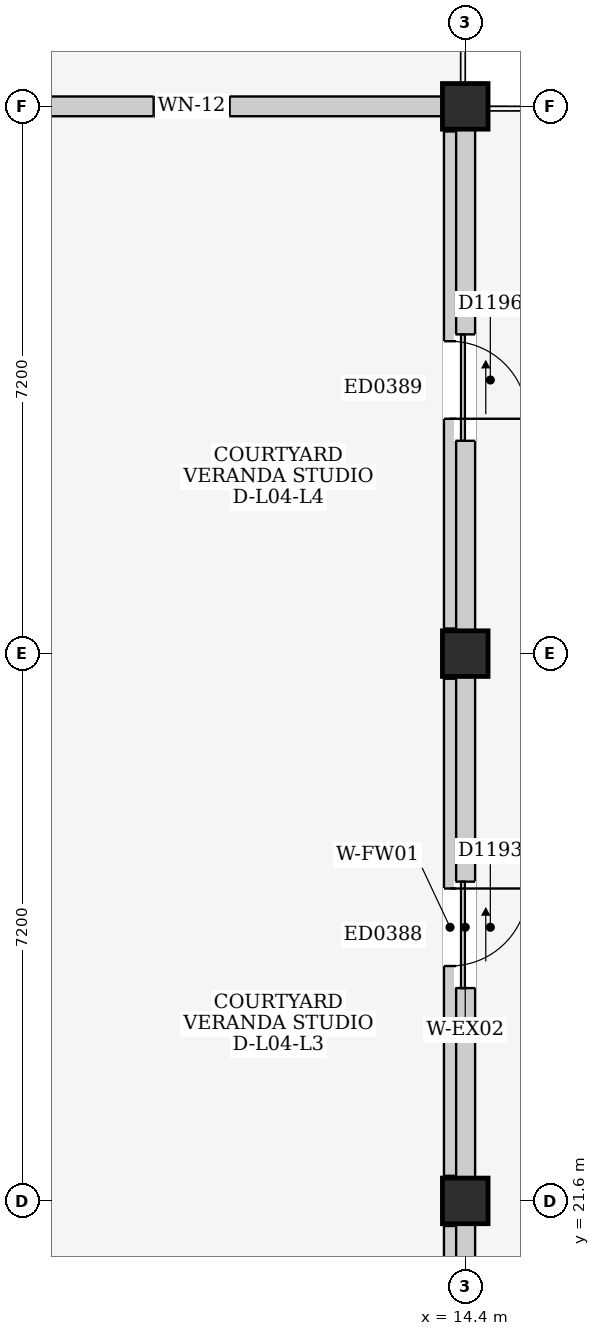
"""IFC4 building model, lengths in metres.
Left out: names, types, materials, properties, quantities, classifications, styles, units other than length and angle.
Written with IfcOpenShell. Run it as: python <this file> out.ifc"""

import sys

from ifc_helpers import new_model, si_unit, direction, frame, frame_2d, origin, origin_2d, place, context, subcontext, project, spatial, rectangle, extrude, element, fill, save


model = new_model("IFC4")
c1 = context("Model", 3, precision=1e-05, world=origin(), true_north=direction((0.0, 1.0)))
c2 = subcontext(c1, "Body", "Model", "MODEL_VIEW")
j1 = project(units=[si_unit("LENGTHUNIT", "METRE"), si_unit("PLANEANGLEUNIT", "RADIAN")], contexts=[c1])
p1 = place(None, origin())
s1 = spatial("IfcSite", under=j1, at=p1, CompositionType="ELEMENT")
p2 = place(p1, origin())
s2 = spatial("IfcBuilding", under=s1, at=p2, CompositionType="ELEMENT")
p3 = place(p2, frame((0.0, 0.0, 15.4)))
s3 = spatial("IfcBuildingStorey", under=s2, at=p3, CompositionType="ELEMENT", Elevation=15.4)
for number, where, z_axis, x_axis in (
    (1, (14.4, 21.6, 0.0), (0.0, 0.0, 1.0), (1.0, 0.0, 0.0)),
    (2, (14.4, 28.8, 0.0), (0.0, 0.0, 1.0), (1.0, 0.0, 0.0)),
    (3, (14.4, 36.0, 0.0), (0.0, 0.0, 1.0), (1.0, 0.0, 0.0)),
):
    element("IfcColumn", number, at=place(p3, frame(where, z_axis=z_axis, x_axis=x_axis)), inside=s3, PredefinedType="COLUMN", context=c2, shape_type="SweptSolid", body=[
        extrude(rectangle(XDim=0.6, YDim=0.6, at=origin_2d()), origin(), (0.0, 0.0, 1.0), 3.2),
    ])
p4 = place(p3, frame((14.4, 14.7, 0.0), z_axis=(0.0, 0.0, 1.0), x_axis=(0.0, 1.0, 0.0)))
e4 = element("IfcWall", 4, at=p4, inside=s3, PredefinedType="ELEMENTEDWALL", context=c2, shape_type="SweptSolid", body=[
    extrude(rectangle(XDim=6.6, YDim=0.26, at=frame_2d((3.3, 0.0))), origin(), (0.0, 0.0, 1.0), 2.385),
])
p5 = place(p4, frame((2.5, 0.0, 0.0)))
e5 = element("IfcOpeningElement", 5, at=p5, cuts=e4, PredefinedType="OPENING", context=c2, shape_type="SweptSolid", body=[
    extrude(rectangle(XDim=1.4, YDim=2.1, at=frame_2d((0.7, 1.05))), frame((0.0, 0.145, 0.0), z_axis=(0.0, -1.0, 0.0), x_axis=(1.0, 0.0, 0.0)), (0.0, 0.0, 1.0), 0.29),
])
p6 = place(p3, frame((14.4, 21.9, 0.0), z_axis=(0.0, 0.0, 1.0), x_axis=(0.0, 1.0, 0.0)))
e6 = element("IfcWall", 6, at=p6, inside=s3, PredefinedType="ELEMENTEDWALL", context=c2, shape_type="SweptSolid", body=[
    extrude(rectangle(XDim=6.6, YDim=0.26, at=frame_2d((3.3, 0.0))), origin(), (0.0, 0.0, 1.0), 2.385),
])
p7 = place(p6, frame((2.5, 0.0, 0.0)))
e7 = element("IfcOpeningElement", 7, at=p7, cuts=e6, PredefinedType="OPENING", context=c2, shape_type="SweptSolid", body=[
    extrude(rectangle(XDim=1.4, YDim=2.1, at=frame_2d((0.7, 1.05))), frame((0.0, 0.145, 0.0), z_axis=(0.0, -1.0, 0.0), x_axis=(1.0, 0.0, 0.0)), (0.0, 0.0, 1.0), 0.29),
])
p8 = place(p3, frame((7.5, 36.0, 0.0), z_axis=(0.0, 0.0, 1.0), x_axis=(1.0, 0.0, 0.0)))
e8 = element("IfcWall", 8, at=p8, inside=s3, PredefinedType="ELEMENTEDWALL", context=c2, shape_type="SweptSolid", body=[
    extrude(rectangle(XDim=6.6, YDim=0.26, at=frame_2d((3.3, 0.0))), origin(), (0.0, 0.0, 1.0), 2.335),
])
p9 = place(p8, frame((2.8, 0.0, 1.1)))
e9 = element("IfcOpeningElement", 9, at=p9, cuts=e8, PredefinedType="OPENING", context=c2, shape_type="SweptSolid", body=[
    extrude(rectangle(XDim=1.0, YDim=0.9, at=frame_2d((0.5, 0.45))), frame((0.0, 0.145, 0.0), z_axis=(0.0, -1.0, 0.0), x_axis=(1.0, 0.0, 0.0)), (0.0, 0.0, 1.0), 0.29),
])
p10 = place(p3, frame((14.4, 29.1, 0.0), z_axis=(0.0, 0.0, 1.0), x_axis=(0.0, 1.0, 0.0)))
e10 = element("IfcWall", 10, at=p10, inside=s3, PredefinedType="ELEMENTEDWALL", context=c2, shape_type="SweptSolid", body=[
    extrude(rectangle(XDim=6.6, YDim=0.26, at=frame_2d((3.3, 0.0))), origin(), (0.0, 0.0, 1.0), 2.385),
])
p11 = place(p10, frame((2.5, 0.0, 0.0)))
e11 = element("IfcOpeningElement", 11, at=p11, cuts=e10, PredefinedType="OPENING", context=c2, shape_type="SweptSolid", body=[
    extrude(rectangle(XDim=1.4, YDim=2.1, at=frame_2d((0.7, 1.05))), frame((0.0, 0.145, 0.0), z_axis=(0.0, -1.0, 0.0), x_axis=(1.0, 0.0, 0.0)), (0.0, 0.0, 1.0), 0.29),
])
p12 = place(p3, frame((14.2, 14.73, 0.0), z_axis=(0.0, 0.0, 1.0), x_axis=(0.0, 1.0, 0.0)))
e12 = element("IfcWall", 12, at=p12, inside=s3, PredefinedType="PARTITIONING", context=c2, shape_type="SweptSolid", body=[
    extrude(rectangle(XDim=6.54, YDim=0.16, at=frame_2d((3.27, 0.0))), origin(), (0.0, 0.0, 1.0), 2.385),
])
p13 = place(p12, frame((2.76, 0.0, 0.0)))
e13 = element("IfcOpeningElement", 13, at=p13, cuts=e12, PredefinedType="OPENING", context=c2, shape_type="SweptSolid", body=[
    extrude(rectangle(XDim=1.02, YDim=2.18, at=frame_2d((0.51, 1.09))), frame((0.0, 0.095, 0.0), z_axis=(0.0, -1.0, 0.0), x_axis=(1.0, 0.0, 0.0)), (0.0, 0.0, 1.0), 0.19),
])
p14 = place(p3, frame((14.2, 21.93, 0.0), z_axis=(0.0, 0.0, 1.0), x_axis=(0.0, 1.0, 0.0)))
e14 = element("IfcWall", 14, at=p14, inside=s3, PredefinedType="PARTITIONING", context=c2, shape_type="SweptSolid", body=[
    extrude(rectangle(XDim=6.54, YDim=0.16, at=frame_2d((3.27, 0.0))), origin(), (0.0, 0.0, 1.0), 2.385),
])
p15 = place(p14, frame((2.76, 0.0, 0.0)))
e15 = element("IfcOpeningElement", 15, at=p15, cuts=e14, PredefinedType="OPENING", context=c2, shape_type="SweptSolid", body=[
    extrude(rectangle(XDim=1.02, YDim=2.18, at=frame_2d((0.51, 1.09))), frame((0.0, 0.095, 0.0), z_axis=(0.0, -1.0, 0.0), x_axis=(1.0, 0.0, 0.0)), (0.0, 0.0, 1.0), 0.19),
])
p16 = place(p3, frame((14.2, 29.13, 0.0), z_axis=(0.0, 0.0, 1.0), x_axis=(0.0, 1.0, 0.0)))
e16 = element("IfcWall", 16, at=p16, inside=s3, PredefinedType="PARTITIONING", context=c2, shape_type="SweptSolid", body=[
    extrude(rectangle(XDim=6.54, YDim=0.16, at=frame_2d((3.27, 0.0))), origin(), (0.0, 0.0, 1.0), 2.385),
])
p17 = place(p16, frame((2.76, 0.0, 0.0)))
e17 = element("IfcOpeningElement", 17, at=p17, cuts=e16, PredefinedType="OPENING", context=c2, shape_type="SweptSolid", body=[
    extrude(rectangle(XDim=1.02, YDim=2.18, at=frame_2d((0.51, 1.09))), frame((0.0, 0.095, 0.0), z_axis=(0.0, -1.0, 0.0), x_axis=(1.0, 0.0, 0.0)), (0.0, 0.0, 1.0), 0.19),
])
p18 = place(p7, frame((1.4, 0.0, 0.0), z_axis=(0.0, 0.0, 1.0), x_axis=(-1.0, 0.0, 0.0)))
e18 = element("IfcDoor", 18, at=p18, inside=s3, OperationType="SLIDING_TO_RIGHT", PredefinedType="DOOR", context=c2, shape_type="SweptSolid", body=[
    extrude(rectangle(XDim=1.4, YDim=2.1, at=frame_2d((0.7, 1.05))), frame((0.0, 0.025, 0.0), z_axis=(0.0, -1.0, 0.0), x_axis=(1.0, 0.0, 0.0)), (0.0, 0.0, 1.0), 0.05),
])
fill(e7, e18)
p19 = place(p9, origin())
e19 = element("IfcWindow", 19, at=p19, inside=s3, PartitioningType="SINGLE_PANEL", PredefinedType="WINDOW", context=c2, shape_type="SweptSolid", body=[
    extrude(rectangle(XDim=1.0, YDim=0.9, at=frame_2d((0.5, 0.45))), frame((0.0, 0.03, 0.0), z_axis=(0.0, -1.0, 0.0), x_axis=(1.0, 0.0, 0.0)), (0.0, 0.0, 1.0), 0.06),
])
fill(e9, e19)
p20 = place(p11, frame((1.4, 0.0, 0.0), z_axis=(0.0, 0.0, 1.0), x_axis=(-1.0, 0.0, 0.0)))
e20 = element("IfcDoor", 20, at=p20, inside=s3, OperationType="SLIDING_TO_RIGHT", PredefinedType="DOOR", context=c2, shape_type="SweptSolid", body=[
    extrude(rectangle(XDim=1.4, YDim=2.1, at=frame_2d((0.7, 1.05))), frame((0.0, 0.025, 0.0), z_axis=(0.0, -1.0, 0.0), x_axis=(1.0, 0.0, 0.0)), (0.0, 0.0, 1.0), 0.05),
])
fill(e11, e20)
p21 = place(p15, frame((1.02, 0.0, 0.0), z_axis=(0.0, 0.0, 1.0), x_axis=(-1.0, 0.0, 0.0)))
e21 = element("IfcDoor", 21, at=p21, inside=s3, OperationType="SINGLE_SWING_LEFT", PredefinedType="DOOR", context=c2, shape_type="SweptSolid", body=[
    extrude(rectangle(XDim=1.02, YDim=2.18, at=frame_2d((0.51, 1.09))), frame((0.0, 0.025, 0.0), z_axis=(0.0, -1.0, 0.0), x_axis=(1.0, 0.0, 0.0)), (0.0, 0.0, 1.0), 0.05),
])
fill(e15, e21)
p22 = place(p17, frame((1.02, 0.0, 0.0), z_axis=(0.0, 0.0, 1.0), x_axis=(-1.0, 0.0, 0.0)))
e22 = element("IfcDoor", 22, at=p22, inside=s3, OperationType="SINGLE_SWING_RIGHT", PredefinedType="DOOR", context=c2, shape_type="SweptSolid", body=[
    extrude(rectangle(XDim=1.02, YDim=2.18, at=frame_2d((0.51, 1.09))), frame((0.0, 0.025, 0.0), z_axis=(0.0, -1.0, 0.0), x_axis=(1.0, 0.0, 0.0)), (0.0, 0.0, 1.0), 0.05),
])
fill(e17, e22)
save(model, sys.argv[1])
